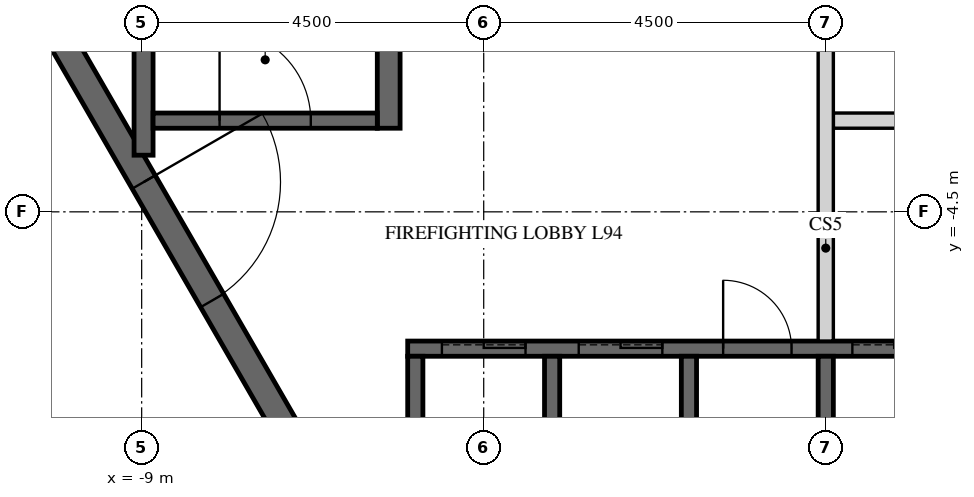
"""IFC4 building model, lengths in metres.
Left out: names, types, materials, properties, quantities, classifications, styles, units other than length and angle.
Written with IfcOpenShell. Run it as: python <this file> out.ifc"""

import sys

from ifc_helpers import new_model, si_unit, direction, frame, frame_2d, origin, place, context, subcontext, project, spatial, polyline, rectangle, outline, extrude, element, fill, save


model = new_model("IFC4")
c1 = context("Model", 3, precision=1e-05, world=origin(), true_north=direction((0.0, 1.0)))
c2 = subcontext(c1, "Body", "Model", "MODEL_VIEW")
j1 = project(units=[si_unit("LENGTHUNIT", "METRE"), si_unit("PLANEANGLEUNIT", "RADIAN")], contexts=[c1])
p1 = place(None, origin())
s1 = spatial("IfcSite", under=j1, at=p1, CompositionType="ELEMENT")
p2 = place(p1, origin())
s2 = spatial("IfcBuilding", under=s1, at=p2, CompositionType="ELEMENT")
p3 = place(p2, frame((0.0, 0.0, 397.2)))
s3 = spatial("IfcBuildingStorey", under=s2, at=p3, CompositionType="ELEMENT", Elevation=397.2)
p4 = place(p3, frame((-10.025, -14.436, 4.5), z_axis=(0.0, 0.0, 1.0), x_axis=(-0.500009078442, 0.86602016228, 0.0)))
e1 = element("IfcWall", 1, at=p4, inside=s3, PredefinedType="PARAPET", context=c2, shape_type="SweptSolid", body=[
    extrude(outline(polyline([(0.009, -0.1), (13.854, -0.1), (13.87, 0.1), (-0.009, 0.1), (0.009, -0.1)])), origin(), (0.0, 0.0, 1.0), 1.1),
])
p5 = place(p3, frame((-11.345, 0.0, -0.2), z_axis=(0.0, 0.0, 1.0), x_axis=(0.499995046907, -0.866028263435, 0.0)))
e2 = element("IfcWall", 2, at=p5, inside=s3, PredefinedType="SHEAR", context=c2, shape_type="SweptSolid", body=[
    extrude(outline(polyline([(-0.101, -0.175), (11.446, -0.175), (11.244, 0.175), (0.101, 0.175), (-0.101, -0.175)])), origin(), (0.0, 0.0, 1.0), 4.5),
])
p6 = place(p5, frame((4.744, 0.0, 0.2)))
e3 = element("IfcOpeningElement", 3, at=p6, cuts=e2, PredefinedType="OPENING", context=c2, shape_type="SweptSolid", body=[
    extrude(rectangle(XDim=1.8, YDim=2.4, at=frame_2d((0.9, 1.2))), frame((0.0, 0.185, 0.0), z_axis=(0.0, -1.0, 0.0), x_axis=(1.0, 0.0, 0.0)), (0.0, 0.0, 1.0), 0.37),
])
p7 = place(p3, frame((-5.5, -6.3, -0.2), z_axis=(0.0, 0.0, 1.0), x_axis=(1.0, 0.0, 0.0)))
e4 = element("IfcWall", 4, at=p7, inside=s3, PredefinedType="SHEAR", context=c2, shape_type="SweptSolid", body=[
    extrude(rectangle(XDim=9.2, YDim=0.2, at=frame_2d((4.6, 0.0))), origin(), (0.0, 0.0, 1.0), 4.5),
])
p8 = place(p7, frame((4.15, 0.0, 0.2)))
e5 = element("IfcOpeningElement", 5, at=p8, cuts=e4, PredefinedType="OPENING", context=c2, shape_type="SweptSolid", body=[
    extrude(rectangle(XDim=0.9, YDim=2.1, at=frame_2d((0.45, 1.05))), frame((0.0, 0.11, 0.0), z_axis=(0.0, -1.0, 0.0), x_axis=(1.0, 0.0, 0.0)), (0.0, 0.0, 1.0), 0.22),
])
p9 = place(p7, frame((7.75, 0.0, 0.2)))
e6 = element("IfcOpeningElement", 6, at=p9, cuts=e4, PredefinedType="OPENING", context=c2, shape_type="SweptSolid", body=[
    extrude(rectangle(XDim=0.9, YDim=2.1, at=frame_2d((0.45, 1.05))), frame((0.0, 0.11, 0.0), z_axis=(0.0, -1.0, 0.0), x_axis=(1.0, 0.0, 0.0)), (0.0, 0.0, 1.0), 0.22),
])
p10 = place(p7, frame((0.45, 0.0, 0.2)))
e7 = element("IfcOpeningElement", 7, at=p10, cuts=e4, PredefinedType="OPENING", context=c2, shape_type="SweptSolid", body=[
    extrude(rectangle(XDim=1.1, YDim=2.1, at=frame_2d((0.55, 1.05))), frame((0.0, 0.11, 0.0), z_axis=(0.0, -1.0, 0.0), x_axis=(1.0, 0.0, 0.0)), (0.0, 0.0, 1.0), 0.22),
])
p11 = place(p7, frame((2.25, 0.0, 0.2)))
e8 = element("IfcOpeningElement", 8, at=p11, cuts=e4, PredefinedType="OPENING", context=c2, shape_type="SweptSolid", body=[
    extrude(rectangle(XDim=1.1, YDim=2.1, at=frame_2d((0.55, 1.05))), frame((0.0, 0.11, 0.0), z_axis=(0.0, -1.0, 0.0), x_axis=(1.0, 0.0, 0.0)), (0.0, 0.0, 1.0), 0.22),
])
p12 = place(p7, frame((5.85, 0.0, 0.2)))
e9 = element("IfcOpeningElement", 9, at=p12, cuts=e4, PredefinedType="OPENING", context=c2, shape_type="SweptSolid", body=[
    extrude(rectangle(XDim=1.1, YDim=2.1, at=frame_2d((0.55, 1.05))), frame((0.0, 0.11, 0.0), z_axis=(0.0, -1.0, 0.0), x_axis=(1.0, 0.0, 0.0)), (0.0, 0.0, 1.0), 0.22),
])
for number, where, z_axis, x_axis in (
    (10, (-5.4, -9.3, -0.2), (0.0, 0.0, 1.0), (0.0, 1.0, 0.0)),
    (11, (-3.6, -9.3, -0.2), (0.0, 0.0, 1.0), (0.0, 1.0, 0.0)),
    (12, (-1.8, -9.3, -0.2), (0.0, 0.0, 1.0), (0.0, 1.0, 0.0)),
    (13, (0.0, -9.3, -0.2), (0.0, 0.0, 1.0), (0.0, 1.0, 0.0)),
):
    element("IfcWall", number, at=place(p3, frame(where, z_axis=z_axis, x_axis=x_axis)), inside=s3, PredefinedType="SHEAR", context=c2, shape_type="SweptSolid", body=[
        extrude(rectangle(XDim=2.9, YDim=0.2, at=frame_2d((1.45, 0.0))), origin(), (0.0, 0.0, 1.0), 4.5),
    ])
p13 = place(p3, frame((0.1, -3.3, 0.0), z_axis=(0.0, 0.0, 1.0), x_axis=(1.0, 0.0, 0.0)))
e14 = element("IfcWall", 14, at=p13, inside=s3, PredefinedType="PARTITIONING", context=c2, shape_type="SweptSolid", body=[
    extrude(rectangle(XDim=5.5, YDim=0.2, at=frame_2d((2.75, 0.0))), origin(), (0.0, 0.0, 1.0), 4.3),
])
p14 = place(p13, frame((2.3, 0.0, 0.0)))
e15 = element("IfcOpeningElement", 15, at=p14, cuts=e14, PredefinedType="OPENING", context=c2, shape_type="SweptSolid", body=[
    extrude(rectangle(XDim=0.9, YDim=2.1, at=frame_2d((0.45, 1.05))), frame((0.0, 0.11, 0.0), z_axis=(0.0, -1.0, 0.0), x_axis=(1.0, 0.0, 0.0)), (0.0, 0.0, 1.0), 0.22),
])
p15 = place(p3, frame((0.0, -6.2, 0.0), z_axis=(0.0, 0.0, 1.0), x_axis=(0.0, 1.0, 0.0)))
e16 = element("IfcWall", 16, at=p15, inside=s3, PredefinedType="PARTITIONING", context=c2, shape_type="SweptSolid", body=[
    extrude(rectangle(XDim=6.1, YDim=0.2, at=frame_2d((3.05, 0.0))), origin(), (0.0, 0.0, 1.0), 4.3),
])
p16 = place(p3, frame((-5.75, -3.4, -0.2), z_axis=(0.0, 0.0, 1.0), x_axis=(0.0, 1.0, 0.0)))
e17 = element("IfcWall", 17, at=p16, inside=s3, PredefinedType="SHEAR", context=c2, shape_type="SweptSolid", body=[
    extrude(rectangle(XDim=6.8, YDim=0.3, at=frame_2d((3.4, 0.0))), origin(), (0.0, 0.0, 1.0), 4.5),
])
p17 = place(p3, frame((-8.975, -3.755, -0.2), z_axis=(0.0, 0.0, 1.0), x_axis=(0.0, 1.0, 0.0)))
e18 = element("IfcWall", 18, at=p17, inside=s3, PredefinedType="SHEAR", context=c2, shape_type="SweptSolid", body=[
    extrude(rectangle(XDim=7.51, YDim=0.25, at=frame_2d((3.755, 0.0))), origin(), (0.0, 0.0, 1.0), 4.5),
])
p18 = place(p3, frame((-8.85, -3.3, -0.2), z_axis=(0.0, 0.0, 1.0), x_axis=(1.0, 0.0, 0.0)))
e19 = element("IfcWall", 19, at=p18, inside=s3, PredefinedType="SHEAR", context=c2, shape_type="SweptSolid", body=[
    extrude(rectangle(XDim=2.95, YDim=0.2, at=frame_2d((1.475, 0.0))), origin(), (0.0, 0.0, 1.0), 4.5),
])
p19 = place(p18, frame((0.875, 0.0, 0.2)))
e20 = element("IfcOpeningElement", 20, at=p19, cuts=e19, PredefinedType="OPENING", context=c2, shape_type="SweptSolid", body=[
    extrude(rectangle(XDim=1.2, YDim=2.4, at=frame_2d((0.6, 1.2))), frame((0.0, 0.11, 0.0), z_axis=(0.0, -1.0, 0.0), x_axis=(1.0, 0.0, 0.0)), (0.0, 0.0, 1.0), 0.22),
])
p20 = place(p6, origin())
e21 = element("IfcDoor", 21, at=p20, inside=s3, OperationType="DOUBLE_DOOR_SINGLE_SWING", PredefinedType="DOOR", context=c2, shape_type="SweptSolid", body=[
    extrude(rectangle(XDim=1.8, YDim=2.4, at=frame_2d((0.9, 1.2))), frame((0.0, 0.025, 0.0), z_axis=(0.0, -1.0, 0.0), x_axis=(1.0, 0.0, 0.0)), (0.0, 0.0, 1.0), 0.05),
])
fill(e3, e21)
p21 = place(p8, origin())
e22 = element("IfcDoor", 22, at=p21, inside=s3, OperationType="SINGLE_SWING_LEFT", PredefinedType="DOOR", context=c2, shape_type="SweptSolid", body=[
    extrude(rectangle(XDim=0.9, YDim=2.1, at=frame_2d((0.45, 1.05))), frame((0.0, 0.025, 0.0), z_axis=(0.0, -1.0, 0.0), x_axis=(1.0, 0.0, 0.0)), (0.0, 0.0, 1.0), 0.05),
])
fill(e5, e22)
p22 = place(p19, origin())
e23 = element("IfcDoor", 23, at=p22, inside=s3, OperationType="SINGLE_SWING_LEFT", PredefinedType="DOOR", context=c2, shape_type="SweptSolid", body=[
    extrude(rectangle(XDim=1.2, YDim=2.4, at=frame_2d((0.6, 1.2))), frame((0.0, 0.025, 0.0), z_axis=(0.0, -1.0, 0.0), x_axis=(1.0, 0.0, 0.0)), (0.0, 0.0, 1.0), 0.05),
])
fill(e20, e23)
p23 = place(p10, origin())
e24 = element("IfcDoor", 24, at=p23, inside=s3, OperationType="SLIDING_TO_LEFT", PredefinedType="DOOR", context=c2, shape_type="SweptSolid", body=[
    extrude(rectangle(XDim=1.1, YDim=2.1, at=frame_2d((0.55, 1.05))), frame((0.0, 0.025, 0.0), z_axis=(0.0, -1.0, 0.0), x_axis=(1.0, 0.0, 0.0)), (0.0, 0.0, 1.0), 0.05),
])
fill(e7, e24)
p24 = place(p11, origin())
e25 = element("IfcDoor", 25, at=p24, inside=s3, OperationType="SLIDING_TO_LEFT", PredefinedType="DOOR", context=c2, shape_type="SweptSolid", body=[
    extrude(rectangle(XDim=1.1, YDim=2.1, at=frame_2d((0.55, 1.05))), frame((0.0, 0.025, 0.0), z_axis=(0.0, -1.0, 0.0), x_axis=(1.0, 0.0, 0.0)), (0.0, 0.0, 1.0), 0.05),
])
fill(e8, e25)
p25 = place(p12, origin())
e26 = element("IfcDoor", 26, at=p25, inside=s3, OperationType="SLIDING_TO_LEFT", PredefinedType="DOOR", context=c2, shape_type="SweptSolid", body=[
    extrude(rectangle(XDim=1.1, YDim=2.1, at=frame_2d((0.55, 1.05))), frame((0.0, 0.025, 0.0), z_axis=(0.0, -1.0, 0.0), x_axis=(1.0, 0.0, 0.0)), (0.0, 0.0, 1.0), 0.05),
])
fill(e9, e26)
save(model, sys.argv[1])
